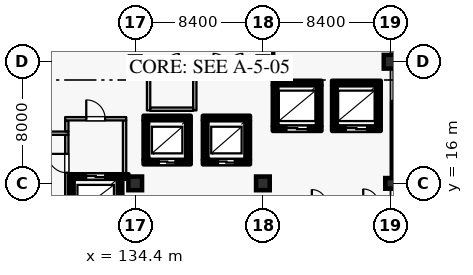
"""IFC4 building model, lengths in metres.
Left out: names, types, materials, properties, quantities, classifications, styles, units other than length and angle.
Written with IfcOpenShell. Run it as: python <this file> out.ifc"""

import sys

from ifc_helpers import new_model, si_unit, direction, frame, frame_2d, origin, origin_2d, place, context, subcontext, project, spatial, rectangle, extrude, element, fill, save


model = new_model("IFC4")
c1 = context("Model", 3, precision=1e-05, world=origin(), true_north=direction((0.0, 1.0)))
c2 = subcontext(c1, "Body", "Model", "MODEL_VIEW")
j1 = project(units=[si_unit("LENGTHUNIT", "METRE"), si_unit("PLANEANGLEUNIT", "RADIAN")], contexts=[c1])
p1 = place(None, origin())
s1 = spatial("IfcSite", under=j1, at=p1, CompositionType="ELEMENT")
p2 = place(p1, origin())
s2 = spatial("IfcBuilding", under=s1, at=p2, CompositionType="ELEMENT")
p3 = place(p2, frame((0.0, 0.0, 21.0)))
s3 = spatial("IfcBuildingStorey", under=s2, at=p3, CompositionType="ELEMENT", Elevation=21.0)
for number, where, z_axis, x_axis in (
    (1, (134.4, 16.0, 0.0), (0.0, 0.0, 1.0), (1.0, 0.0, 0.0)),
    (2, (142.8, 16.0, 0.0), (0.0, 0.0, 1.0), (1.0, 0.0, 0.0)),
    (3, (151.2, 24.0, 0.0), (0.0, 0.0, 1.0), (1.0, 0.0, 0.0)),
):
    element("IfcColumn", number, at=place(p3, frame(where, z_axis=z_axis, x_axis=x_axis)), inside=s3, PredefinedType="COLUMN", context=c2, shape_type="SweptSolid", body=[
        extrude(rectangle(XDim=0.9, YDim=0.9, at=origin_2d()), origin(), (0.0, 0.0, 1.0), 4.2),
    ])
for number, where, z_axis, x_axis in (
    (4, (134.4, 24.0, 0.0), (0.0, 0.0, 1.0), (1.0, 0.0, 0.0)),
    (5, (142.8, 24.0, 0.0), (0.0, 0.0, 1.0), (1.0, 0.0, 0.0)),
    (6, (151.2, 16.0, 0.0), (0.0, 0.0, 1.0), (1.0, 0.0, 0.0)),
):
    element("IfcColumn", number, at=place(p3, frame(where, z_axis=z_axis, x_axis=x_axis)), inside=s3, PredefinedType="COLUMN", context=c2, shape_type="SweptSolid", body=[
        extrude(rectangle(XDim=0.7, YDim=0.7, at=origin_2d()), origin(), (0.0, 0.0, 1.0), 4.2),
    ])
p4 = place(p3, frame((134.95, 17.4, 0.0), z_axis=(0.0, 0.0, 1.0), x_axis=(1.0, 0.0, 0.0)))
e7 = element("IfcWall", 7, at=p4, inside=s3, PredefinedType="SHEAR", context=c2, shape_type="SweptSolid", body=[
    extrude(rectangle(XDim=3.1, YDim=0.3, at=frame_2d((1.55, 0.0))), origin(), (0.0, 0.0, 1.0), 3.965),
])
p5 = place(p4, frame((1.0, 0.0, 0.0)))
e8 = element("IfcOpeningElement", 8, at=p5, cuts=e7, PredefinedType="OPENING", context=c2, shape_type="SweptSolid", body=[
    extrude(rectangle(XDim=1.1, YDim=2.2, at=frame_2d((0.55, 1.1))), frame((0.0, 0.16, 0.0), z_axis=(0.0, -1.0, 0.0), x_axis=(1.0, 0.0, 0.0)), (0.0, 0.0, 1.0), 0.32),
])
p6 = place(p3, frame((137.9, 17.555, 0.0), z_axis=(0.0, 0.0, 1.0), x_axis=(0.0, 1.0, 0.0)))
e9 = element("IfcWall", 9, at=p6, inside=s3, PredefinedType="SHEAR", context=c2, shape_type="SweptSolid", body=[
    extrude(rectangle(XDim=2.59, YDim=0.3, at=frame_2d((1.295, 0.0))), origin(), (0.0, 0.0, 1.0), 3.965),
])
p7 = place(p3, frame((138.05, 20.3, 0.0), z_axis=(0.0, 0.0, 1.0), x_axis=(-1.0, 0.0, 0.0)))
e10 = element("IfcWall", 10, at=p7, inside=s3, PredefinedType="SHEAR", context=c2, shape_type="SweptSolid", body=[
    extrude(rectangle(XDim=3.1, YDim=0.3, at=frame_2d((1.55, 0.0))), origin(), (0.0, 0.0, 1.0), 3.965),
])
p8 = place(p3, frame((135.1, 20.145, 0.0), z_axis=(0.0, 0.0, 1.0), x_axis=(0.0, -1.0, 0.0)))
e11 = element("IfcWall", 11, at=p8, inside=s3, PredefinedType="SHEAR", context=c2, shape_type="SweptSolid", body=[
    extrude(rectangle(XDim=2.59, YDim=0.3, at=frame_2d((1.295, 0.0))), origin(), (0.0, 0.0, 1.0), 3.965),
])
p9 = place(p3, frame((138.85, 17.4, 0.0), z_axis=(0.0, 0.0, 1.0), x_axis=(1.0, 0.0, 0.0)))
e12 = element("IfcWall", 12, at=p9, inside=s3, PredefinedType="SHEAR", context=c2, shape_type="SweptSolid", body=[
    extrude(rectangle(XDim=3.1, YDim=0.3, at=frame_2d((1.55, 0.0))), origin(), (0.0, 0.0, 1.0), 3.965),
])
p10 = place(p9, frame((1.0, 0.0, 0.0)))
e13 = element("IfcOpeningElement", 13, at=p10, cuts=e12, PredefinedType="OPENING", context=c2, shape_type="SweptSolid", body=[
    extrude(rectangle(XDim=1.1, YDim=2.2, at=frame_2d((0.55, 1.1))), frame((0.0, 0.16, 0.0), z_axis=(0.0, -1.0, 0.0), x_axis=(1.0, 0.0, 0.0)), (0.0, 0.0, 1.0), 0.32),
])
p11 = place(p3, frame((141.8, 17.555, 0.0), z_axis=(0.0, 0.0, 1.0), x_axis=(0.0, 1.0, 0.0)))
e14 = element("IfcWall", 14, at=p11, inside=s3, PredefinedType="SHEAR", context=c2, shape_type="SweptSolid", body=[
    extrude(rectangle(XDim=2.59, YDim=0.3, at=frame_2d((1.295, 0.0))), origin(), (0.0, 0.0, 1.0), 3.965),
])
p12 = place(p3, frame((141.95, 20.3, 0.0), z_axis=(0.0, 0.0, 1.0), x_axis=(-1.0, 0.0, 0.0)))
e15 = element("IfcWall", 15, at=p12, inside=s3, PredefinedType="SHEAR", context=c2, shape_type="SweptSolid", body=[
    extrude(rectangle(XDim=3.1, YDim=0.3, at=frame_2d((1.55, 0.0))), origin(), (0.0, 0.0, 1.0), 3.965),
])
p13 = place(p3, frame((139.0, 20.145, 0.0), z_axis=(0.0, 0.0, 1.0), x_axis=(0.0, -1.0, 0.0)))
e16 = element("IfcWall", 16, at=p13, inside=s3, PredefinedType="SHEAR", context=c2, shape_type="SweptSolid", body=[
    extrude(rectangle(XDim=2.59, YDim=0.3, at=frame_2d((1.295, 0.0))), origin(), (0.0, 0.0, 1.0), 3.965),
])
p14 = place(p3, frame((133.4, 13.705, 0.0), z_axis=(0.0, 0.0, 1.0), x_axis=(0.0, 1.0, 0.0)))
e17 = element("IfcWall", 17, at=p14, inside=s3, PredefinedType="SHEAR", context=c2, shape_type="SweptSolid", body=[
    extrude(rectangle(XDim=2.59, YDim=0.3, at=frame_2d((1.295, 0.0))), origin(), (0.0, 0.0, 1.0), 3.965),
])
p15 = place(p3, frame((133.96, 16.45, 0.0), z_axis=(0.0, 0.0, 1.0), x_axis=(-1.0, 0.0, 0.0)))
e18 = element("IfcWall", 18, at=p15, inside=s3, PredefinedType="SHEAR", context=c2, shape_type="SweptSolid", body=[
    extrude(rectangle(XDim=3.91, YDim=0.3, at=frame_2d((1.955, 0.0))), origin(), (0.0, 0.0, 1.0), 3.965),
])
p16 = place(p15, frame((1.535, 0.0, 0.0)))
e19 = element("IfcOpeningElement", 19, at=p16, cuts=e18, PredefinedType="OPENING", context=c2, shape_type="SweptSolid", body=[
    extrude(rectangle(XDim=1.25, YDim=2.25, at=frame_2d((0.625, 1.125))), frame((0.0, 0.16, 0.0), z_axis=(0.0, -1.0, 0.0), x_axis=(1.0, 0.0, 0.0)), (0.0, 0.0, 1.0), 0.32),
])
p17 = place(p3, frame((130.2, 16.295, 0.0), z_axis=(0.0, 0.0, 1.0), x_axis=(0.0, -1.0, 0.0)))
e20 = element("IfcWall", 20, at=p17, inside=s3, PredefinedType="SHEAR", context=c2, shape_type="SweptSolid", body=[
    extrude(rectangle(XDim=2.59, YDim=0.3, at=frame_2d((1.295, 0.0))), origin(), (0.0, 0.0, 1.0), 3.965),
])
p18 = place(p3, frame((143.45, 19.6, 0.0), z_axis=(0.0, 0.0, 1.0), x_axis=(1.0, 0.0, 0.0)))
e21 = element("IfcWall", 21, at=p18, inside=s3, PredefinedType="SHEAR", context=c2, shape_type="SweptSolid", body=[
    extrude(rectangle(XDim=3.2, YDim=0.3, at=frame_2d((1.6, 0.0))), origin(), (0.0, 0.0, 1.0), 3.965),
])
p19 = place(p18, frame((0.9, 0.0, 0.0)))
e22 = element("IfcOpeningElement", 22, at=p19, cuts=e21, PredefinedType="OPENING", context=c2, shape_type="SweptSolid", body=[
    extrude(rectangle(XDim=1.4, YDim=2.35, at=frame_2d((0.7, 1.175))), frame((0.0, 0.16, 0.0), z_axis=(0.0, -1.0, 0.0), x_axis=(1.0, 0.0, 0.0)), (0.0, 0.0, 1.0), 0.32),
])
p20 = place(p3, frame((146.5, 19.755, 0.0), z_axis=(0.0, 0.0, 1.0), x_axis=(0.0, 1.0, 0.0)))
e23 = element("IfcWall", 23, at=p20, inside=s3, PredefinedType="SHEAR", context=c2, shape_type="SweptSolid", body=[
    extrude(rectangle(XDim=2.69, YDim=0.3, at=frame_2d((1.345, 0.0))), origin(), (0.0, 0.0, 1.0), 3.965),
])
p21 = place(p3, frame((146.65, 22.6, 0.0), z_axis=(0.0, 0.0, 1.0), x_axis=(-1.0, 0.0, 0.0)))
e24 = element("IfcWall", 24, at=p21, inside=s3, PredefinedType="SHEAR", context=c2, shape_type="SweptSolid", body=[
    extrude(rectangle(XDim=3.2, YDim=0.3, at=frame_2d((1.6, 0.0))), origin(), (0.0, 0.0, 1.0), 3.965),
])
p22 = place(p3, frame((143.6, 22.445, 0.0), z_axis=(0.0, 0.0, 1.0), x_axis=(0.0, -1.0, 0.0)))
e25 = element("IfcWall", 25, at=p22, inside=s3, PredefinedType="SHEAR", context=c2, shape_type="SweptSolid", body=[
    extrude(rectangle(XDim=2.69, YDim=0.3, at=frame_2d((1.345, 0.0))), origin(), (0.0, 0.0, 1.0), 3.965),
])
p23 = place(p3, frame((147.35, 19.6, 0.0), z_axis=(0.0, 0.0, 1.0), x_axis=(1.0, 0.0, 0.0)))
e26 = element("IfcWall", 26, at=p23, inside=s3, PredefinedType="SHEAR", context=c2, shape_type="SweptSolid", body=[
    extrude(rectangle(XDim=3.2, YDim=0.3, at=frame_2d((1.6, 0.0))), origin(), (0.0, 0.0, 1.0), 3.965),
])
p24 = place(p23, frame((0.9, 0.0, 0.0)))
e27 = element("IfcOpeningElement", 27, at=p24, cuts=e26, PredefinedType="OPENING", context=c2, shape_type="SweptSolid", body=[
    extrude(rectangle(XDim=1.4, YDim=2.35, at=frame_2d((0.7, 1.175))), frame((0.0, 0.16, 0.0), z_axis=(0.0, -1.0, 0.0), x_axis=(1.0, 0.0, 0.0)), (0.0, 0.0, 1.0), 0.32),
])
p25 = place(p3, frame((150.4, 19.755, 0.0), z_axis=(0.0, 0.0, 1.0), x_axis=(0.0, 1.0, 0.0)))
e28 = element("IfcWall", 28, at=p25, inside=s3, PredefinedType="SHEAR", context=c2, shape_type="SweptSolid", body=[
    extrude(rectangle(XDim=2.69, YDim=0.3, at=frame_2d((1.345, 0.0))), origin(), (0.0, 0.0, 1.0), 3.965),
])
p26 = place(p3, frame((150.55, 22.6, 0.0), z_axis=(0.0, 0.0, 1.0), x_axis=(-1.0, 0.0, 0.0)))
e29 = element("IfcWall", 29, at=p26, inside=s3, PredefinedType="SHEAR", context=c2, shape_type="SweptSolid", body=[
    extrude(rectangle(XDim=3.2, YDim=0.3, at=frame_2d((1.6, 0.0))), origin(), (0.0, 0.0, 1.0), 3.965),
])
p27 = place(p3, frame((147.5, 22.445, 0.0), z_axis=(0.0, 0.0, 1.0), x_axis=(0.0, -1.0, 0.0)))
e30 = element("IfcWall", 30, at=p27, inside=s3, PredefinedType="SHEAR", context=c2, shape_type="SweptSolid", body=[
    extrude(rectangle(XDim=2.69, YDim=0.3, at=frame_2d((1.345, 0.0))), origin(), (0.0, 0.0, 1.0), 3.965),
])
p28 = place(p3, frame((126.19, 19.3, 0.0), z_axis=(0.0, 0.0, 1.0), x_axis=(1.0, 0.0, 0.0)))
e31 = element("IfcWall", 31, at=p28, inside=s3, PredefinedType="PARTITIONING", context=c2, shape_type="SweptSolid", body=[
    extrude(rectangle(XDim=3.82, YDim=0.22, at=frame_2d((1.91, 0.0))), origin(), (0.0, 0.0, 1.0), 3.965),
])
p29 = place(p28, frame((1.35, 0.0, 0.0)))
e32 = element("IfcOpeningElement", 32, at=p29, cuts=e31, PredefinedType="OPENING", context=c2, shape_type="SweptSolid", body=[
    extrude(rectangle(XDim=1.12, YDim=2.2, at=frame_2d((0.56, 1.1))), frame((0.0, 0.12, 0.0), z_axis=(0.0, -1.0, 0.0), x_axis=(1.0, 0.0, 0.0)), (0.0, 0.0, 1.0), 0.24),
])
p30 = place(p3, frame((129.9, 13.365, 0.0), z_axis=(0.0, 0.0, 1.0), x_axis=(0.0, 1.0, 0.0)))
e33 = element("IfcWall", 33, at=p30, inside=s3, PredefinedType="PARTITIONING", context=c2, shape_type="SweptSolid", body=[
    extrude(rectangle(XDim=5.82, YDim=0.22, at=frame_2d((2.91, 0.0))), origin(), (0.0, 0.0, 1.0), 3.965),
])
p31 = place(p30, frame((3.335, 0.0, 0.0)))
e34 = element("IfcOpeningElement", 34, at=p31, cuts=e33, PredefinedType="OPENING", context=c2, shape_type="SweptSolid", body=[
    extrude(rectangle(XDim=1.24, YDim=2.2, at=frame_2d((0.62, 1.1))), frame((0.0, 0.12, 0.0), z_axis=(0.0, -1.0, 0.0), x_axis=(1.0, 0.0, 0.0)), (0.0, 0.0, 1.0), 0.24),
])
p32 = place(p3, frame((129.9, 19.415, 0.0), z_axis=(0.0, 0.0, 1.0), x_axis=(0.0, 1.0, 0.0)))
e35 = element("IfcWall", 35, at=p32, inside=s3, PredefinedType="PARTITIONING", context=c2, shape_type="SweptSolid", body=[
    extrude(rectangle(XDim=0.72, YDim=0.22, at=frame_2d((0.36, 0.0))), origin(), (0.0, 0.0, 1.0), 3.965),
])
p33 = place(p3, frame((133.7, 16.605, 0.0), z_axis=(0.0, 0.0, 1.0), x_axis=(0.0, 1.0, 0.0)))
e36 = element("IfcWall", 36, at=p33, inside=s3, PredefinedType="PARTITIONING", context=c2, shape_type="SweptSolid", body=[
    extrude(rectangle(XDim=3.53, YDim=0.22, at=frame_2d((1.765, 0.0))), origin(), (0.0, 0.0, 1.0), 3.965),
])
p34 = place(p3, frame((129.79, 20.25, 0.0), z_axis=(0.0, 0.0, 1.0), x_axis=(1.0, 0.0, 0.0)))
e37 = element("IfcWall", 37, at=p34, inside=s3, PredefinedType="PARTITIONING", context=c2, shape_type="SweptSolid", body=[
    extrude(rectangle(XDim=4.02, YDim=0.22, at=frame_2d((2.01, 0.0))), origin(), (0.0, 0.0, 1.0), 3.965),
])
p35 = place(p34, frame((1.39, 0.0, 0.0)))
e38 = element("IfcOpeningElement", 38, at=p35, cuts=e37, PredefinedType="OPENING", context=c2, shape_type="SweptSolid", body=[
    extrude(rectangle(XDim=1.24, YDim=2.2, at=frame_2d((0.62, 1.1))), frame((0.0, 0.12, 0.0), z_axis=(0.0, -1.0, 0.0), x_axis=(1.0, 0.0, 0.0)), (0.0, 0.0, 1.0), 0.24),
])
p36 = place(p3, frame((151.3, 16.8, 0.0), z_axis=(0.0, 0.0, 1.0), x_axis=(1.0, 0.0, 0.0)))
e39 = element("IfcWall", 39, at=p36, inside=s3, PredefinedType="SHEAR", context=c2, shape_type="SweptSolid", body=[
    extrude(rectangle(XDim=8.2, YDim=0.4, at=frame_2d((4.1, 0.0))), origin(), (0.0, 0.0, 1.0), 3.965),
])
p37 = place(p3, frame((151.3, 21.16, 0.0), z_axis=(0.0, 0.0, 1.0), x_axis=(1.0, 0.0, 0.0)))
e40 = element("IfcWall", 40, at=p37, inside=s3, PredefinedType="SHEAR", context=c2, shape_type="SweptSolid", body=[
    extrude(rectangle(XDim=8.2, YDim=0.4, at=frame_2d((4.1, 0.0))), origin(), (0.0, 0.0, 1.0), 3.965),
])
p38 = place(p37, frame((0.43, 0.0, 0.0)))
e41 = element("IfcOpeningElement", 41, at=p38, cuts=e40, PredefinedType="OPENING", context=c2, shape_type="SweptSolid", body=[
    extrude(rectangle(XDim=1.16, YDim=2.2, at=frame_2d((0.58, 1.1))), frame((0.0, 0.21, 0.0), z_axis=(0.0, -1.0, 0.0), x_axis=(1.0, 0.0, 0.0)), (0.0, 0.0, 1.0), 0.42),
])
p39 = place(p3, frame((151.5, 17.005, 0.0), z_axis=(0.0, 0.0, 1.0), x_axis=(0.0, 1.0, 0.0)))
e42 = element("IfcWall", 42, at=p39, inside=s3, PredefinedType="SHEAR", context=c2, shape_type="SweptSolid", body=[
    extrude(rectangle(XDim=3.95, YDim=0.4, at=frame_2d((1.975, 0.0))), origin(), (0.0, 0.0, 1.0), 3.965),
])
p40 = place(p3, frame((151.5, 21.365, 0.0), z_axis=(0.0, 0.0, 1.0), x_axis=(0.0, 1.0, 0.0)))
e43 = element("IfcWall", 43, at=p40, inside=s3, PredefinedType="PARTITIONING", context=c2, shape_type="SweptSolid", body=[
    extrude(rectangle(XDim=5.82, YDim=0.22, at=frame_2d((2.91, 0.0))), origin(), (0.0, 0.0, 1.0), 3.965),
])
p41 = place(p3, frame((138.96, 23.6, 0.0), z_axis=(0.0, 0.0, 1.0), x_axis=(1.0, 0.0, 0.0)))
e44 = element("IfcWall", 44, at=p41, inside=s3, PredefinedType="PARTITIONING", context=c2, shape_type="SweptSolid", body=[
    extrude(rectangle(XDim=3.08, YDim=0.14, at=frame_2d((1.54, 0.0))), origin(), (0.0, 0.0, 1.0), 3.965),
])
p42 = place(p41, frame((0.59, 0.0, 0.0)))
e45 = element("IfcOpeningElement", 45, at=p42, cuts=e44, PredefinedType="OPENING", context=c2, shape_type="SweptSolid", body=[
    extrude(rectangle(XDim=1.9, YDim=2.4, at=frame_2d((0.95, 1.2))), frame((0.0, 0.08, 0.0), z_axis=(0.0, -1.0, 0.0), x_axis=(1.0, 0.0, 0.0)), (0.0, 0.0, 1.0), 0.16),
])
p43 = place(p3, frame((135.36, 23.6, 0.0), z_axis=(0.0, 0.0, 1.0), x_axis=(1.0, 0.0, 0.0)))
e46 = element("IfcWall", 46, at=p43, inside=s3, PredefinedType="PARTITIONING", context=c2, shape_type="SweptSolid", body=[
    extrude(rectangle(XDim=2.88, YDim=0.22, at=frame_2d((1.44, 0.0))), origin(), (0.0, 0.0, 1.0), 3.965),
])
p44 = place(p43, frame((0.97, 0.0, 0.0)))
e47 = element("IfcOpeningElement", 47, at=p44, cuts=e46, PredefinedType="OPENING", context=c2, shape_type="SweptSolid", body=[
    extrude(rectangle(XDim=0.94, YDim=2.15, at=frame_2d((0.47, 1.075))), frame((0.0, 0.12, 0.0), z_axis=(0.0, -1.0, 0.0), x_axis=(1.0, 0.0, 0.0)), (0.0, 0.0, 1.0), 0.24),
])
p45 = place(p3, frame((143.48, 23.45, 0.0), z_axis=(0.0, 0.0, 1.0), x_axis=(0.0, 1.0, 0.0)))
e48 = element("IfcWall", 48, at=p45, inside=s3, PredefinedType="PARTITIONING", context=c2, shape_type="SweptSolid", body=[
    extrude(rectangle(XDim=3.21, YDim=0.14, at=frame_2d((1.605, 0.0))), origin(), (0.0, 0.0, 1.0), 3.965),
])
for number, where, z_axis, x_axis in (
    (49, (135.28, 20.8, 0.0), (0.0, 0.0, 1.0), (0.0, 1.0, 0.0)),
    (50, (138.32, 20.8, 0.0), (0.0, 0.0, 1.0), (0.0, 1.0, 0.0)),
):
    element("IfcWall", number, at=place(p3, frame(where, z_axis=z_axis, x_axis=x_axis)), inside=s3, PredefinedType="PARTITIONING", context=c2, shape_type="SweptSolid", body=[
        extrude(rectangle(XDim=2.748, YDim=0.22, at=frame_2d((1.374, 0.0))), origin(), (0.0, 0.0, 1.0), 3.965),
    ])
p46 = place(p3, frame((135.39, 20.88, 0.0), z_axis=(0.0, 0.0, 1.0), x_axis=(1.0, 0.0, 0.0)))
e51 = element("IfcWall", 51, at=p46, inside=s3, PredefinedType="PARTITIONING", context=c2, shape_type="SweptSolid", body=[
    extrude(rectangle(XDim=2.82, YDim=0.22, at=frame_2d((1.41, 0.0))), origin(), (0.0, 0.0, 1.0), 3.965),
])
p47 = place(p5, origin())
e52 = element("IfcDoor", 52, at=p47, inside=s3, OperationType="DOUBLE_DOOR_SLIDING", PredefinedType="DOOR", context=c2, shape_type="SweptSolid", body=[
    extrude(rectangle(XDim=1.1, YDim=2.2, at=frame_2d((0.55, 1.1))), frame((0.0, 0.025, 0.0), z_axis=(0.0, -1.0, 0.0), x_axis=(1.0, 0.0, 0.0)), (0.0, 0.0, 1.0), 0.05),
])
fill(e8, e52)
p48 = place(p10, origin())
e53 = element("IfcDoor", 53, at=p48, inside=s3, OperationType="DOUBLE_DOOR_SLIDING", PredefinedType="DOOR", context=c2, shape_type="SweptSolid", body=[
    extrude(rectangle(XDim=1.1, YDim=2.2, at=frame_2d((0.55, 1.1))), frame((0.0, 0.025, 0.0), z_axis=(0.0, -1.0, 0.0), x_axis=(1.0, 0.0, 0.0)), (0.0, 0.0, 1.0), 0.05),
])
fill(e13, e53)
p49 = place(p16, origin())
e54 = element("IfcDoor", 54, at=p49, inside=s3, OperationType="DOUBLE_DOOR_SLIDING", PredefinedType="DOOR", context=c2, shape_type="SweptSolid", body=[
    extrude(rectangle(XDim=1.25, YDim=2.25, at=frame_2d((0.625, 1.125))), frame((0.0, 0.025, 0.0), z_axis=(0.0, -1.0, 0.0), x_axis=(1.0, 0.0, 0.0)), (0.0, 0.0, 1.0), 0.05),
])
fill(e19, e54)
p50 = place(p19, origin())
e55 = element("IfcDoor", 55, at=p50, inside=s3, OperationType="DOUBLE_DOOR_SLIDING", PredefinedType="DOOR", context=c2, shape_type="SweptSolid", body=[
    extrude(rectangle(XDim=1.4, YDim=2.35, at=frame_2d((0.7, 1.175))), frame((0.0, 0.025, 0.0), z_axis=(0.0, -1.0, 0.0), x_axis=(1.0, 0.0, 0.0)), (0.0, 0.0, 1.0), 0.05),
])
fill(e22, e55)
p51 = place(p24, origin())
e56 = element("IfcDoor", 56, at=p51, inside=s3, OperationType="DOUBLE_DOOR_SLIDING", PredefinedType="DOOR", context=c2, shape_type="SweptSolid", body=[
    extrude(rectangle(XDim=1.4, YDim=2.35, at=frame_2d((0.7, 1.175))), frame((0.0, 0.025, 0.0), z_axis=(0.0, -1.0, 0.0), x_axis=(1.0, 0.0, 0.0)), (0.0, 0.0, 1.0), 0.05),
])
fill(e27, e56)
p52 = place(p31, origin())
e57 = element("IfcDoor", 57, at=p52, inside=s3, OperationType="SINGLE_SWING_RIGHT", PredefinedType="DOOR", context=c2, shape_type="SweptSolid", body=[
    extrude(rectangle(XDim=1.24, YDim=2.2, at=frame_2d((0.62, 1.1))), frame((0.0, 0.025, 0.0), z_axis=(0.0, -1.0, 0.0), x_axis=(1.0, 0.0, 0.0)), (0.0, 0.0, 1.0), 0.05),
])
fill(e34, e57)
p53 = place(p35, origin())
e58 = element("IfcDoor", 58, at=p53, inside=s3, OperationType="SINGLE_SWING_LEFT", PredefinedType="DOOR", context=c2, shape_type="SweptSolid", body=[
    extrude(rectangle(XDim=1.24, YDim=2.2, at=frame_2d((0.62, 1.1))), frame((0.0, 0.025, 0.0), z_axis=(0.0, -1.0, 0.0), x_axis=(1.0, 0.0, 0.0)), (0.0, 0.0, 1.0), 0.05),
])
fill(e38, e58)
p54 = place(p42, origin())
e59 = element("IfcDoor", 59, at=p54, inside=s3, OperationType="DOUBLE_DOOR_SINGLE_SWING", PredefinedType="DOOR", context=c2, shape_type="SweptSolid", body=[
    extrude(rectangle(XDim=1.9, YDim=2.4, at=frame_2d((0.95, 1.2))), frame((0.0, 0.025, 0.0), z_axis=(0.0, -1.0, 0.0), x_axis=(1.0, 0.0, 0.0)), (0.0, 0.0, 1.0), 0.05),
])
fill(e45, e59)
p55 = place(p44, origin())
e60 = element("IfcDoor", 60, at=p55, inside=s3, OperationType="SINGLE_SWING_RIGHT", PredefinedType="DOOR", context=c2, shape_type="SweptSolid", body=[
    extrude(rectangle(XDim=0.94, YDim=2.15, at=frame_2d((0.47, 1.075))), frame((0.0, 0.025, 0.0), z_axis=(0.0, -1.0, 0.0), x_axis=(1.0, 0.0, 0.0)), (0.0, 0.0, 1.0), 0.05),
])
fill(e47, e60)
save(model, sys.argv[1])
